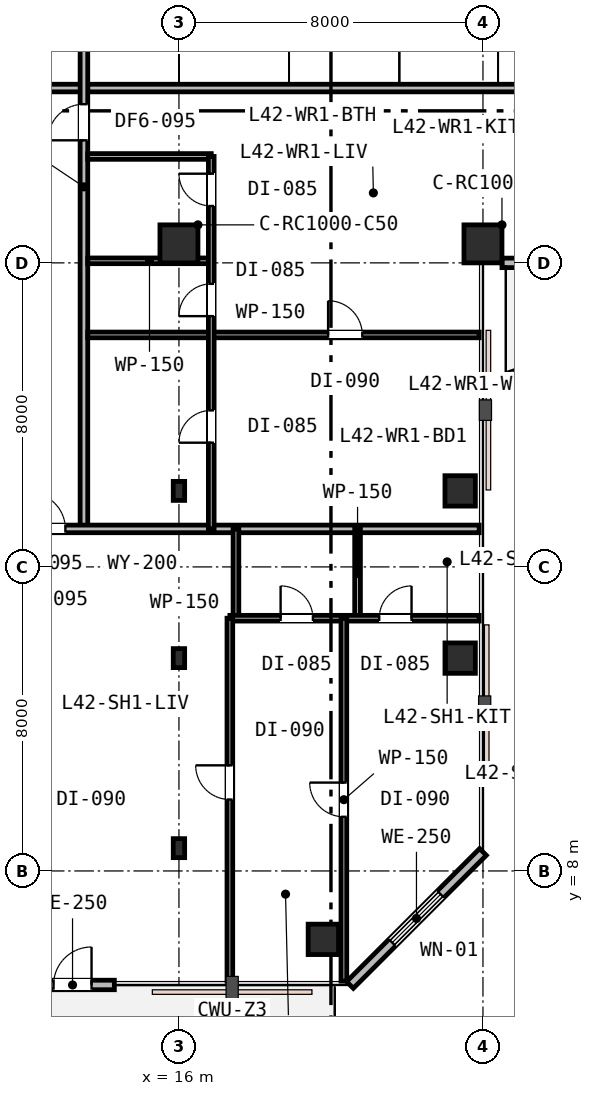
"""IFC4 building model, lengths in metres.
Left out: names, types, materials, properties, quantities, classifications, styles, units other than length and angle.
Written with IfcOpenShell. Run it as: python <this file> out.ifc"""

import sys

from ifc_helpers import new_model, si_unit, direction, frame, frame_2d, origin, origin_2d, place, context, subcontext, project, spatial, rectangle, i_section, extrude, element, fill, save


model = new_model("IFC4")
c1 = context("Model", 3, precision=1e-05, world=origin(), true_north=direction((0.0, 1.0)))
c2 = subcontext(c1, "Body", "Model", "MODEL_VIEW")
j1 = project(units=[si_unit("LENGTHUNIT", "METRE"), si_unit("PLANEANGLEUNIT", "RADIAN")], contexts=[c1])
p1 = place(None, origin())
s1 = spatial("IfcSite", under=j1, at=p1, CompositionType="ELEMENT")
p2 = place(p1, origin())
s2 = spatial("IfcBuilding", under=s1, at=p2, CompositionType="ELEMENT")
p3 = place(p2, frame((0.0, 0.0, 165.0)))
s3 = spatial("IfcBuildingStorey", under=s2, at=p3, CompositionType="ELEMENT", Elevation=165.0)
for number, where, z_axis, x_axis in (
    (1, (16.0, 24.5, 0.0), (0.0, 0.0, 1.0), (1.0, 0.0, 0.0)),
    (2, (24.0, 24.5, 0.0), (0.0, 0.0, 1.0), (1.0, 0.0, 0.0)),
):
    element("IfcColumn", number, at=place(p3, frame(where, z_axis=z_axis, x_axis=x_axis)), inside=s3, PredefinedType="COLUMN", context=c2, shape_type="SweptSolid", body=[
        extrude(rectangle(XDim=1.0, YDim=1.0, at=origin_2d()), origin(), (0.0, 0.0, 1.0), 3.6),
    ])
for number, where, z_axis, x_axis in (
    (3, (19.8, 6.2, 0.0), (0.0, 0.0, 1.0), (1.0, 0.0, 0.0)),
    (4, (23.4, 13.6, 0.0), (0.0, 0.0, 1.0), (1.0, 0.0, 0.0)),
    (5, (23.4, 18.0, 0.0), (0.0, 0.0, 1.0), (1.0, 0.0, 0.0)),
):
    element("IfcColumn", number, at=place(p3, frame(where, z_axis=z_axis, x_axis=x_axis)), inside=s3, PredefinedType="COLUMN", context=c2, shape_type="SweptSolid", body=[
        extrude(rectangle(XDim=0.8, YDim=0.8, at=origin_2d()), origin(), (0.0, 0.0, 1.0), 3.6),
    ])
for number, where, z_axis, x_axis in (
    (6, (16.0, 8.6, 0.0), (0.0, 0.0, 1.0), (1.0, 0.0, 0.0)),
    (7, (16.0, 13.6, 0.0), (0.0, 0.0, 1.0), (1.0, 0.0, 0.0)),
    (8, (16.0, 18.0, 0.0), (0.0, 0.0, 1.0), (1.0, 0.0, 0.0)),
):
    element("IfcColumn", number, at=place(p3, frame(where, z_axis=z_axis, x_axis=x_axis)), inside=s3, PredefinedType="COLUMN", context=c2, shape_type="SweptSolid", body=[
        extrude(i_section(OverallWidth=0.3, OverallDepth=0.5, WebThickness=0.015, FlangeThickness=0.028, FilletRadius=0.027, at=origin_2d()), origin(), (0.0, 0.0, 1.0), 3.6),
    ])
p4 = place(p3, frame((12.1, 5.0, 0.0), z_axis=(0.0, 0.0, 1.0), x_axis=(1.0, 0.0, 0.0)))
e9 = element("IfcWall", 9, at=p4, inside=s3, PredefinedType="STANDARD", context=c2, shape_type="SweptSolid", body=[
    extrude(rectangle(XDim=2.2, YDim=0.25, at=frame_2d((1.1, 0.0))), origin(), (0.0, 0.0, 1.0), 3.33),
])
p5 = place(p4, frame((0.6, 0.0, 0.0)))
e10 = element("IfcOpeningElement", 10, at=p5, cuts=e9, PredefinedType="OPENING", context=c2, shape_type="SweptSolid", body=[
    extrude(rectangle(XDim=1.0, YDim=2.15, at=frame_2d((0.5, 1.075))), frame((0.0, 0.135, 0.0), z_axis=(0.0, -1.0, 0.0), x_axis=(1.0, 0.0, 0.0)), (0.0, 0.0, 1.0), 0.27),
])
p6 = place(p3, frame((20.5, 5.0, 0.0), z_axis=(0.0, 0.0, 1.0), x_axis=(0.707106781187, 0.707106781187, 0.0)))
e11 = element("IfcWall", 11, at=p6, inside=s3, PredefinedType="STANDARD", context=c2, shape_type="SweptSolid", body=[
    extrude(rectangle(XDim=4.95, YDim=0.25, at=frame_2d((2.475, 0.0))), origin(), (0.0, 0.0, 1.0), 3.33),
])
p7 = place(p6, frame((1.575, 0.0, 0.75)))
e12 = element("IfcOpeningElement", 12, at=p7, cuts=e11, PredefinedType="OPENING", context=c2, shape_type="SweptSolid", body=[
    extrude(rectangle(XDim=1.8, YDim=1.85, at=frame_2d((0.9, 0.925))), frame((0.0, 0.135, 0.0), z_axis=(0.0, -1.0, 0.0), x_axis=(1.0, 0.0, 0.0)), (0.0, 0.0, 1.0), 0.27),
])
p8 = place(p3, frame((24.5, 24.0, 0.0), z_axis=(0.0, 0.0, 1.0), x_axis=(1.0, 0.0, 0.0)))
e13 = element("IfcWall", 13, at=p8, inside=s3, PredefinedType="STANDARD", context=c2, shape_type="SweptSolid", body=[
    extrude(rectangle(XDim=1.35, YDim=0.25, at=frame_2d((0.675, 0.0))), origin(), (0.0, 0.0, 1.0), 3.01),
])
p9 = place(p3, frame((5.1, 28.6, 0.0), z_axis=(0.0, 0.0, 1.0), x_axis=(1.0, 0.0, 0.0)))
e14 = element("IfcWall", 14, at=p9, inside=s3, PredefinedType="PARTITIONING", context=c2, shape_type="SweptSolid", body=[
    extrude(rectangle(XDim=8.4, YDim=0.2, at=frame_2d((4.2, 0.0))), origin(), (0.0, 0.0, 1.0), 2.93),
])
p10 = place(p3, frame((13.6, 28.6, 0.0), z_axis=(0.0, 0.0, 1.0), x_axis=(1.0, 0.0, 0.0)))
e15 = element("IfcWall", 15, at=p10, inside=s3, PredefinedType="PARTITIONING", context=c2, shape_type="SweptSolid", body=[
    extrude(rectangle(XDim=37.3, YDim=0.2, at=frame_2d((18.65, 0.0))), origin(), (0.0, 0.0, 1.0), 2.93),
])
p11 = place(p10, frame((16.025, 0.0, 0.0)))
e16 = element("IfcOpeningElement", 16, at=p11, cuts=e15, PredefinedType="OPENING", context=c2, shape_type="SweptSolid", body=[
    extrude(rectangle(XDim=0.95, YDim=2.15, at=frame_2d((0.475, 1.075))), frame((0.0, 0.11, 0.0), z_axis=(0.0, -1.0, 0.0), x_axis=(1.0, 0.0, 0.0)), (0.0, 0.0, 1.0), 0.22),
])
p12 = place(p10, frame((25.925, 0.0, 0.0)))
e17 = element("IfcOpeningElement", 17, at=p12, cuts=e15, PredefinedType="OPENING", context=c2, shape_type="SweptSolid", body=[
    extrude(rectangle(XDim=0.95, YDim=2.15, at=frame_2d((0.475, 1.075))), frame((0.0, 0.11, 0.0), z_axis=(0.0, -1.0, 0.0), x_axis=(1.0, 0.0, 0.0)), (0.0, 0.0, 1.0), 0.22),
])
p13 = place(p3, frame((13.5, 17.0, 0.0), z_axis=(0.0, 0.0, 1.0), x_axis=(0.0, 1.0, 0.0)))
e18 = element("IfcWall", 18, at=p13, inside=s3, PredefinedType="PARTITIONING", context=c2, shape_type="SweptSolid", body=[
    extrude(rectangle(XDim=18.0, YDim=0.2, at=frame_2d((9.0, 0.0))), origin(), (0.0, 0.0, 1.0), 2.93),
])
p14 = place(p13, frame((15.425, 0.0, 0.0)))
e19 = element("IfcOpeningElement", 19, at=p14, cuts=e18, PredefinedType="OPENING", context=c2, shape_type="SweptSolid", body=[
    extrude(rectangle(XDim=0.95, YDim=2.15, at=frame_2d((0.475, 1.075))), frame((0.0, 0.11, 0.0), z_axis=(0.0, -1.0, 0.0), x_axis=(1.0, 0.0, 0.0)), (0.0, 0.0, 1.0), 0.22),
])
p15 = place(p13, frame((10.225, 0.0, 0.0)))
e20 = element("IfcOpeningElement", 20, at=p15, cuts=e18, PredefinedType="OPENING", context=c2, shape_type="SweptSolid", body=[
    extrude(rectangle(XDim=0.95, YDim=2.15, at=frame_2d((0.475, 1.075))), frame((0.0, 0.11, 0.0), z_axis=(0.0, -1.0, 0.0), x_axis=(1.0, 0.0, 0.0)), (0.0, 0.0, 1.0), 0.22),
])
p16 = place(p3, frame((5.1, 17.0, 0.0), z_axis=(0.0, 0.0, 1.0), x_axis=(1.0, 0.0, 0.0)))
e21 = element("IfcWall", 21, at=p16, inside=s3, PredefinedType="PARTITIONING", context=c2, shape_type="SweptSolid", body=[
    extrude(rectangle(XDim=18.8, YDim=0.2, at=frame_2d((9.4, 0.0))), origin(), (0.0, 0.0, 1.0), 2.93),
])
p17 = place(p16, frame((6.962, 0.0, 0.0)))
e22 = element("IfcOpeningElement", 22, at=p17, cuts=e21, PredefinedType="OPENING", context=c2, shape_type="SweptSolid", body=[
    extrude(rectangle(XDim=0.95, YDim=2.15, at=frame_2d((0.475, 1.075))), frame((0.0, 0.11, 0.0), z_axis=(0.0, -1.0, 0.0), x_axis=(1.0, 0.0, 0.0)), (0.0, 0.0, 1.0), 0.22),
])
p18 = place(p3, frame((13.6, 22.104, 0.0), z_axis=(0.0, 0.0, 1.0), x_axis=(1.0, 0.0, 0.0)))
e23 = element("IfcWall", 23, at=p18, inside=s3, PredefinedType="PARTITIONING", context=c2, shape_type="SweptSolid", body=[
    extrude(rectangle(XDim=10.3, YDim=0.15, at=frame_2d((5.15, 0.0))), origin(), (0.0, 0.0, 1.0), 2.93),
])
p19 = place(p18, frame((6.325, 0.0, 0.0)))
e24 = element("IfcOpeningElement", 24, at=p19, cuts=e23, PredefinedType="OPENING", context=c2, shape_type="SweptSolid", body=[
    extrude(rectangle(XDim=0.9, YDim=2.15, at=frame_2d((0.45, 1.075))), frame((0.0, 0.085, 0.0), z_axis=(0.0, -1.0, 0.0), x_axis=(1.0, 0.0, 0.0)), (0.0, 0.0, 1.0), 0.17),
])
for number, where, z_axis, x_axis in (
    (25, (13.6, 24.054, 0.0), (0.0, 0.0, 1.0), (1.0, 0.0, 0.0)),
    (26, (13.6, 26.8, 0.0), (0.0, 0.0, 1.0), (1.0, 0.0, 0.0)),
):
    element("IfcWall", number, at=place(p3, frame(where, z_axis=z_axis, x_axis=x_axis)), inside=s3, PredefinedType="PARTITIONING", context=c2, shape_type="SweptSolid", body=[
        extrude(rectangle(XDim=3.25, YDim=0.15, at=frame_2d((1.625, 0.0))), origin(), (0.0, 0.0, 1.0), 2.93),
    ])
p20 = place(p3, frame((16.85, 17.0, 0.0), z_axis=(0.0, 0.0, 1.0), x_axis=(0.0, 1.0, 0.0)))
e27 = element("IfcWall", 27, at=p20, inside=s3, PredefinedType="PARTITIONING", context=c2, shape_type="SweptSolid", body=[
    extrude(rectangle(XDim=9.8, YDim=0.15, at=frame_2d((4.9, 0.0))), origin(), (0.0, 0.0, 1.0), 2.93),
])
p21 = place(p20, frame((5.598, 0.0, 0.0)))
e28 = element("IfcOpeningElement", 28, at=p21, cuts=e27, PredefinedType="OPENING", context=c2, shape_type="SweptSolid", body=[
    extrude(rectangle(XDim=0.85, YDim=2.15, at=frame_2d((0.425, 1.075))), frame((0.0, 0.085, 0.0), z_axis=(0.0, -1.0, 0.0), x_axis=(1.0, 0.0, 0.0)), (0.0, 0.0, 1.0), 0.17),
])
p22 = place(p20, frame((8.496, 0.0, 0.0)))
e29 = element("IfcOpeningElement", 29, at=p22, cuts=e27, PredefinedType="OPENING", context=c2, shape_type="SweptSolid", body=[
    extrude(rectangle(XDim=0.85, YDim=2.15, at=frame_2d((0.425, 1.075))), frame((0.0, 0.085, 0.0), z_axis=(0.0, -1.0, 0.0), x_axis=(1.0, 0.0, 0.0)), (0.0, 0.0, 1.0), 0.17),
])
p23 = place(p20, frame((2.268, 0.0, 0.0)))
e30 = element("IfcOpeningElement", 30, at=p23, cuts=e27, PredefinedType="OPENING", context=c2, shape_type="SweptSolid", body=[
    extrude(rectangle(XDim=0.85, YDim=2.15, at=frame_2d((0.425, 1.075))), frame((0.0, 0.085, 0.0), z_axis=(0.0, -1.0, 0.0), x_axis=(1.0, 0.0, 0.0)), (0.0, 0.0, 1.0), 0.17),
])
p24 = place(p3, frame((17.5, 14.65, 0.0), z_axis=(0.0, 0.0, 1.0), x_axis=(0.0, 1.0, 0.0)))
e31 = element("IfcWall", 31, at=p24, inside=s3, PredefinedType="PARTITIONING", context=c2, shape_type="SweptSolid", body=[
    extrude(rectangle(XDim=2.35, YDim=0.15, at=frame_2d((1.175, 0.0))), origin(), (0.0, 0.0, 1.0), 3.33),
])
p25 = place(p3, frame((20.7, 14.65, 0.0), z_axis=(0.0, 0.0, 1.0), x_axis=(0.0, 1.0, 0.0)))
e32 = element("IfcWall", 32, at=p25, inside=s3, PredefinedType="PARTITIONING", context=c2, shape_type="SweptSolid", body=[
    extrude(rectangle(XDim=2.35, YDim=0.15, at=frame_2d((1.175, 0.0))), origin(), (0.0, 0.0, 1.0), 2.96),
])
p26 = place(p3, frame((17.34, 14.65, 0.0), z_axis=(0.0, 0.0, 1.0), x_axis=(1.0, 0.0, 0.0)))
e33 = element("IfcWall", 33, at=p26, inside=s3, PredefinedType="PARTITIONING", context=c2, shape_type="SweptSolid", body=[
    extrude(rectangle(XDim=6.56, YDim=0.15, at=frame_2d((3.28, 0.0))), origin(), (0.0, 0.0, 1.0), 2.96),
])
p27 = place(p26, frame((1.335, 0.0, 0.0)))
e34 = element("IfcOpeningElement", 34, at=p27, cuts=e33, PredefinedType="OPENING", context=c2, shape_type="SweptSolid", body=[
    extrude(rectangle(XDim=0.85, YDim=2.15, at=frame_2d((0.425, 1.075))), frame((0.0, 0.085, 0.0), z_axis=(0.0, -1.0, 0.0), x_axis=(1.0, 0.0, 0.0)), (0.0, 0.0, 1.0), 0.17),
])
p28 = place(p26, frame((3.93, 0.0, 0.0)))
e35 = element("IfcOpeningElement", 35, at=p28, cuts=e33, PredefinedType="OPENING", context=c2, shape_type="SweptSolid", body=[
    extrude(rectangle(XDim=0.85, YDim=2.15, at=frame_2d((0.425, 1.075))), frame((0.0, 0.085, 0.0), z_axis=(0.0, -1.0, 0.0), x_axis=(1.0, 0.0, 0.0)), (0.0, 0.0, 1.0), 0.17),
])
p29 = place(p3, frame((20.34, 5.1, 0.0), z_axis=(0.0, 0.0, 1.0), x_axis=(0.0, 1.0, 0.0)))
e36 = element("IfcWall", 36, at=p29, inside=s3, PredefinedType="PARTITIONING", context=c2, shape_type="SweptSolid", body=[
    extrude(rectangle(XDim=9.55, YDim=0.15, at=frame_2d((4.775, 0.0))), origin(), (0.0, 0.0, 1.0), 2.93),
])
p30 = place(p29, frame((4.325, 0.0, 0.0)))
e37 = element("IfcOpeningElement", 37, at=p30, cuts=e36, PredefinedType="OPENING", context=c2, shape_type="SweptSolid", body=[
    extrude(rectangle(XDim=0.9, YDim=2.15, at=frame_2d((0.45, 1.075))), frame((0.0, 0.085, 0.0), z_axis=(0.0, -1.0, 0.0), x_axis=(1.0, 0.0, 0.0)), (0.0, 0.0, 1.0), 0.17),
])
p31 = place(p3, frame((17.34, 5.1, 0.0), z_axis=(0.0, 0.0, 1.0), x_axis=(0.0, 1.0, 0.0)))
e38 = element("IfcWall", 38, at=p31, inside=s3, PredefinedType="PARTITIONING", context=c2, shape_type="SweptSolid", body=[
    extrude(rectangle(XDim=9.55, YDim=0.15, at=frame_2d((4.775, 0.0))), origin(), (0.0, 0.0, 1.0), 2.93),
])
p32 = place(p31, frame((4.779, 0.0, 0.0)))
e39 = element("IfcOpeningElement", 39, at=p32, cuts=e38, PredefinedType="OPENING", context=c2, shape_type="SweptSolid", body=[
    extrude(rectangle(XDim=0.9, YDim=2.15, at=frame_2d((0.45, 1.075))), frame((0.0, 0.085, 0.0), z_axis=(0.0, -1.0, 0.0), x_axis=(1.0, 0.0, 0.0)), (0.0, 0.0, 1.0), 0.17),
])
p33 = place(p5, origin())
e40 = element("IfcDoor", 40, at=p33, inside=s3, OperationType="SINGLE_SWING_RIGHT", PredefinedType="DOOR", context=c2, shape_type="SweptSolid", body=[
    extrude(rectangle(XDim=1.0, YDim=2.15, at=frame_2d((0.5, 1.075))), frame((0.0, 0.025, 0.0), z_axis=(0.0, -1.0, 0.0), x_axis=(1.0, 0.0, 0.0)), (0.0, 0.0, 1.0), 0.05),
])
fill(e10, e40)
p34 = place(p7, origin())
e41 = element("IfcWindow", 41, at=p34, inside=s3, PartitioningType="SINGLE_PANEL", PredefinedType="WINDOW", context=c2, shape_type="SweptSolid", body=[
    extrude(rectangle(XDim=1.8, YDim=1.85, at=frame_2d((0.9, 0.925))), frame((0.0, 0.03, 0.0), z_axis=(0.0, -1.0, 0.0), x_axis=(1.0, 0.0, 0.0)), (0.0, 0.0, 1.0), 0.06),
])
fill(e12, e41)
p35 = place(p15, origin())
e42 = element("IfcDoor", 42, at=p35, inside=s3, OperationType="SINGLE_SWING_LEFT", PredefinedType="DOOR", context=c2, shape_type="SweptSolid", body=[
    extrude(rectangle(XDim=0.95, YDim=2.15, at=frame_2d((0.475, 1.075))), frame((0.0, 0.025, 0.0), z_axis=(0.0, -1.0, 0.0), x_axis=(1.0, 0.0, 0.0)), (0.0, 0.0, 1.0), 0.05),
])
fill(e20, e42)
p36 = place(p21, origin())
e43 = element("IfcDoor", 43, at=p36, inside=s3, OperationType="SINGLE_SWING_LEFT", PredefinedType="DOOR", context=c2, shape_type="SweptSolid", body=[
    extrude(rectangle(XDim=0.85, YDim=2.15, at=frame_2d((0.425, 1.075))), frame((0.0, 0.025, 0.0), z_axis=(0.0, -1.0, 0.0), x_axis=(1.0, 0.0, 0.0)), (0.0, 0.0, 1.0), 0.05),
])
fill(e28, e43)
p37 = place(p22, origin())
e44 = element("IfcDoor", 44, at=p37, inside=s3, OperationType="SINGLE_SWING_RIGHT", PredefinedType="DOOR", context=c2, shape_type="SweptSolid", body=[
    extrude(rectangle(XDim=0.85, YDim=2.15, at=frame_2d((0.425, 1.075))), frame((0.0, 0.025, 0.0), z_axis=(0.0, -1.0, 0.0), x_axis=(1.0, 0.0, 0.0)), (0.0, 0.0, 1.0), 0.05),
])
fill(e29, e44)
p38 = place(p23, origin())
e45 = element("IfcDoor", 45, at=p38, inside=s3, OperationType="SINGLE_SWING_LEFT", PredefinedType="DOOR", context=c2, shape_type="SweptSolid", body=[
    extrude(rectangle(XDim=0.85, YDim=2.15, at=frame_2d((0.425, 1.075))), frame((0.0, 0.025, 0.0), z_axis=(0.0, -1.0, 0.0), x_axis=(1.0, 0.0, 0.0)), (0.0, 0.0, 1.0), 0.05),
])
fill(e30, e45)
p39 = place(p19, origin())
e46 = element("IfcDoor", 46, at=p39, inside=s3, OperationType="SINGLE_SWING_LEFT", PredefinedType="DOOR", context=c2, shape_type="SweptSolid", body=[
    extrude(rectangle(XDim=0.9, YDim=2.15, at=frame_2d((0.45, 1.075))), frame((0.0, 0.025, 0.0), z_axis=(0.0, -1.0, 0.0), x_axis=(1.0, 0.0, 0.0)), (0.0, 0.0, 1.0), 0.05),
])
fill(e24, e46)
p40 = place(p17, origin())
e47 = element("IfcDoor", 47, at=p40, inside=s3, OperationType="SINGLE_SWING_LEFT", PredefinedType="DOOR", context=c2, shape_type="SweptSolid", body=[
    extrude(rectangle(XDim=0.95, YDim=2.15, at=frame_2d((0.475, 1.075))), frame((0.0, 0.025, 0.0), z_axis=(0.0, -1.0, 0.0), x_axis=(1.0, 0.0, 0.0)), (0.0, 0.0, 1.0), 0.05),
])
fill(e22, e47)
p41 = place(p27, origin())
e48 = element("IfcDoor", 48, at=p41, inside=s3, OperationType="SINGLE_SWING_LEFT", PredefinedType="DOOR", context=c2, shape_type="SweptSolid", body=[
    extrude(rectangle(XDim=0.85, YDim=2.15, at=frame_2d((0.425, 1.075))), frame((0.0, 0.025, 0.0), z_axis=(0.0, -1.0, 0.0), x_axis=(1.0, 0.0, 0.0)), (0.0, 0.0, 1.0), 0.05),
])
fill(e34, e48)
p42 = place(p28, origin())
e49 = element("IfcDoor", 49, at=p42, inside=s3, OperationType="SINGLE_SWING_RIGHT", PredefinedType="DOOR", context=c2, shape_type="SweptSolid", body=[
    extrude(rectangle(XDim=0.85, YDim=2.15, at=frame_2d((0.425, 1.075))), frame((0.0, 0.025, 0.0), z_axis=(0.0, -1.0, 0.0), x_axis=(1.0, 0.0, 0.0)), (0.0, 0.0, 1.0), 0.05),
])
fill(e35, e49)
p43 = place(p30, origin())
e50 = element("IfcDoor", 50, at=p43, inside=s3, OperationType="SINGLE_SWING_RIGHT", PredefinedType="DOOR", context=c2, shape_type="SweptSolid", body=[
    extrude(rectangle(XDim=0.9, YDim=2.15, at=frame_2d((0.45, 1.075))), frame((0.0, 0.025, 0.0), z_axis=(0.0, -1.0, 0.0), x_axis=(1.0, 0.0, 0.0)), (0.0, 0.0, 1.0), 0.05),
])
fill(e37, e50)
p44 = place(p32, origin())
e51 = element("IfcDoor", 51, at=p44, inside=s3, OperationType="SINGLE_SWING_RIGHT", PredefinedType="DOOR", context=c2, shape_type="SweptSolid", body=[
    extrude(rectangle(XDim=0.9, YDim=2.15, at=frame_2d((0.45, 1.075))), frame((0.0, 0.025, 0.0), z_axis=(0.0, -1.0, 0.0), x_axis=(1.0, 0.0, 0.0)), (0.0, 0.0, 1.0), 0.05),
])
fill(e39, e51)
save(model, sys.argv[1])
